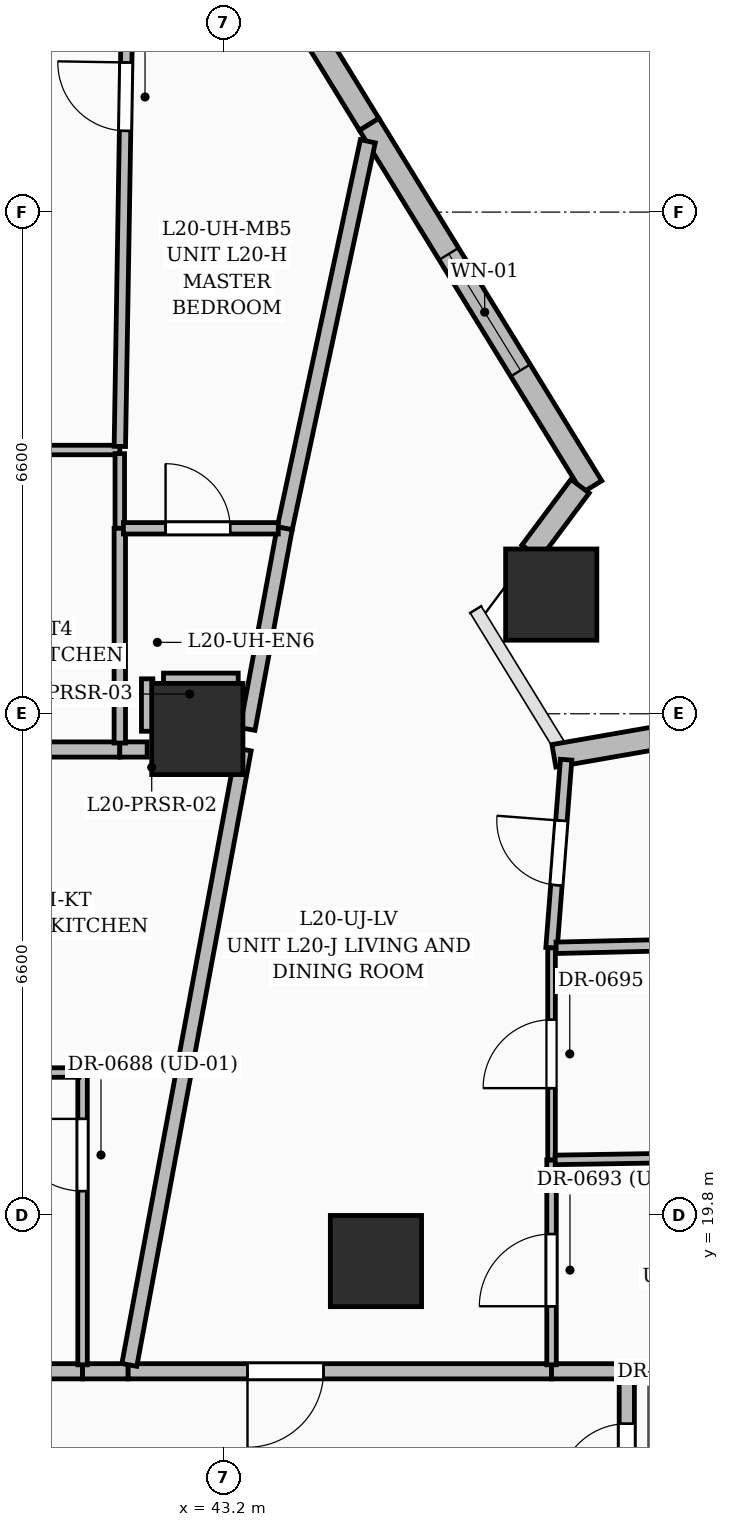
"""IFC4 building model, lengths in metres.
Left out: names, types, materials, properties, quantities, classifications, styles, units other than length and angle.
Written with IfcOpenShell. Run it as: python <this file> out.ifc"""

import sys

from ifc_helpers import new_model, si_unit, direction, frame, frame_2d, origin, origin_2d, place, context, subcontext, project, spatial, rectangle, extrude, element, fill, save


model = new_model("IFC4")
c1 = context("Model", 3, precision=1e-05, world=origin(), true_north=direction((0.0, 1.0)))
c2 = subcontext(c1, "Body", "Model", "MODEL_VIEW")
j1 = project(units=[si_unit("LENGTHUNIT", "METRE"), si_unit("PLANEANGLEUNIT", "RADIAN")], contexts=[c1])
p1 = place(None, origin())
s1 = spatial("IfcSite", under=j1, at=p1, CompositionType="ELEMENT")
p2 = place(p1, origin())
s2 = spatial("IfcBuilding", under=s1, at=p2, CompositionType="ELEMENT")
p3 = place(p2, frame((0.0, 0.0, 82.2)))
s3 = spatial("IfcBuildingStorey", under=s2, at=p3, CompositionType="ELEMENT", Elevation=82.2)
for number, where, z_axis, x_axis in (
    (1, (45.2, 19.2, 0.0), (0.0, 0.0, 1.0), (1.0, 0.0, 0.0)),
    (2, (42.85, 26.2, 0.0), (0.0, 0.0, 1.0), (1.0, 0.0, 0.0)),
    (3, (47.506, 27.968, 0.0), (0.0, 0.0, 1.0), (1.0, 0.0, 0.0)),
):
    element("IfcColumn", number, at=place(p3, frame(where, z_axis=z_axis, x_axis=x_axis)), inside=s3, PredefinedType="COLUMN", context=c2, shape_type="SweptSolid", body=[
        extrude(rectangle(XDim=1.2, YDim=1.2, at=origin_2d()), origin(), (0.0, 0.0, 1.0), 3.6),
    ])
p4 = place(p3, frame((42.153, 38.967, 0.0), z_axis=(0.0, 0.0, 1.0), x_axis=(0.523687465278, -0.851910464022, 0.0)))
e4 = element("IfcWall", 4, at=p4, inside=s3, PredefinedType="SOLIDWALL", context=c2, shape_type="SweptSolid", body=[
    extrude(rectangle(XDim=5.649, YDim=0.3, at=frame_2d((2.825, 0.0))), origin(), (0.0, 0.0, 1.0), 3.35),
])
p5 = place(p4, frame((1.778, 0.0, 0.55)))
e5 = element("IfcOpeningElement", 5, at=p5, cuts=e4, PredefinedType="OPENING", context=c2, shape_type="SweptSolid", body=[
    extrude(rectangle(XDim=2.1, YDim=2.4, at=frame_2d((1.05, 1.2))), frame((0.0, 0.16, 0.0), z_axis=(0.0, -1.0, 0.0), x_axis=(1.0, 0.0, 0.0)), (0.0, 0.0, 1.0), 0.32),
])
p6 = place(p3, frame((45.111, 34.154, 0.0), z_axis=(0.0, 0.0, 1.0), x_axis=(0.523710369238, -0.851896384047, 0.0)))
e6 = element("IfcWall", 6, at=p6, inside=s3, PredefinedType="SOLIDWALL", context=c2, shape_type="SweptSolid", body=[
    extrude(rectangle(XDim=5.596, YDim=0.3, at=frame_2d((2.798, 0.0))), origin(), (0.0, 0.0, 1.0), 3.35),
])
p7 = place(p6, frame((2.0, 0.0, 0.6)))
e7 = element("IfcOpeningElement", 7, at=p7, cuts=e6, PredefinedType="OPENING", context=c2, shape_type="SweptSolid", body=[
    extrude(rectangle(XDim=1.8, YDim=2.1, at=frame_2d((0.9, 1.05))), frame((0.0, 0.16, 0.0), z_axis=(0.0, -1.0, 0.0), x_axis=(1.0, 0.0, 0.0)), (0.0, 0.0, 1.0), 0.32),
])
p8 = place(p3, frame((47.885, 29.394, 0.0), z_axis=(0.0, 0.0, 1.0), x_axis=(-0.598186461049, -0.801356947819, 0.0)))
e8 = element("IfcWall", 8, at=p8, inside=s3, PredefinedType="SOLIDWALL", context=c2, shape_type="SweptSolid", body=[
    extrude(rectangle(XDim=1.078, YDim=0.3, at=frame_2d((0.539, 0.0))), origin(), (0.0, 0.0, 1.0), 2.375),
])
p9 = place(p3, frame((47.541, 25.847, 0.0), z_axis=(0.0, 0.0, 1.0), x_axis=(0.985095505459, 0.172008270511, 0.0)))
e9 = element("IfcWall", 9, at=p9, inside=s3, PredefinedType="SOLIDWALL", context=c2, shape_type="SweptSolid", body=[
    extrude(rectangle(XDim=2.594, YDim=0.3, at=frame_2d((1.297, 0.0))), origin(), (0.0, 0.0, 1.0), 2.375),
])
p10 = place(p3, frame((48.5, 15.47, 0.0), z_axis=(0.0, 0.0, 1.0), x_axis=(0.0, 1.0, 0.0)))
e10 = element("IfcWall", 10, at=p10, inside=s3, PredefinedType="PARTITIONING", context=c2, shape_type="SweptSolid", body=[
    extrude(rectangle(XDim=2.28, YDim=0.2, at=frame_2d((1.14, 0.0))), origin(), (0.0, 0.0, 1.0), 2.345),
])
p11 = place(p10, frame((0.69, 0.0, 0.0)))
e11 = element("IfcOpeningElement", 11, at=p11, cuts=e10, PredefinedType="OPENING", context=c2, shape_type="SweptSolid", body=[
    extrude(rectangle(XDim=0.9, YDim=2.1, at=frame_2d((0.45, 1.05))), frame((0.0, 0.11, 0.0), z_axis=(0.0, -1.0, 0.0), x_axis=(1.0, 0.0, 0.0)), (0.0, 0.0, 1.0), 0.22),
])
p12 = place(p3, frame((41.34, 17.75, 0.0), z_axis=(0.0, 0.0, 1.0), x_axis=(-1.0, 0.0, 0.0)))
e12 = element("IfcWall", 12, at=p12, inside=s3, PredefinedType="PARTITIONING", context=c2, shape_type="SweptSolid", body=[
    extrude(rectangle(XDim=6.47, YDim=0.2, at=frame_2d((3.235, 0.0))), origin(), (0.0, 0.0, 1.0), 3.35),
])
p13 = place(p12, frame((2.735, 0.0, 0.0)))
e13 = element("IfcOpeningElement", 13, at=p13, cuts=e12, PredefinedType="OPENING", context=c2, shape_type="SweptSolid", body=[
    extrude(rectangle(XDim=1.0, YDim=2.2, at=frame_2d((0.5, 1.1))), frame((0.0, 0.11, 0.0), z_axis=(0.0, -1.0, 0.0), x_axis=(1.0, 0.0, 0.0)), (0.0, 0.0, 1.0), 0.22),
])
p14 = place(p3, frame((41.94, 17.75, 0.0), z_axis=(0.0, 0.0, 1.0), x_axis=(-1.0, 0.0, 0.0)))
e14 = element("IfcWall", 14, at=p14, inside=s3, PredefinedType="PARTITIONING", context=c2, shape_type="SweptSolid", body=[
    extrude(rectangle(XDim=0.6, YDim=0.2, at=frame_2d((0.3, 0.0))), origin(), (0.0, 0.0, 1.0), 3.35),
])
p15 = place(p3, frame((47.51, 17.75, 0.0), z_axis=(0.0, 0.0, 1.0), x_axis=(-1.0, 0.0, 0.0)))
e15 = element("IfcWall", 15, at=p15, inside=s3, PredefinedType="PARTITIONING", context=c2, shape_type="SweptSolid", body=[
    extrude(rectangle(XDim=5.57, YDim=0.2, at=frame_2d((2.785, 0.0))), origin(), (0.0, 0.0, 1.0), 2.309),
])
p16 = place(p15, frame((3.0, 0.0, 0.0)))
e16 = element("IfcOpeningElement", 16, at=p16, cuts=e15, PredefinedType="OPENING", context=c2, shape_type="SweptSolid", body=[
    extrude(rectangle(XDim=1.0, YDim=2.2, at=frame_2d((0.5, 1.1))), frame((0.0, 0.11, 0.0), z_axis=(0.0, -1.0, 0.0), x_axis=(1.0, 0.0, 0.0)), (0.0, 0.0, 1.0), 0.22),
])
p17 = place(p3, frame((48.415, 17.75, 0.0), z_axis=(0.0, 0.0, 1.0), x_axis=(-1.0, 0.0, 0.0)))
e17 = element("IfcWall", 17, at=p17, inside=s3, PredefinedType="PARTITIONING", context=c2, shape_type="SweptSolid", body=[
    extrude(rectangle(XDim=0.905, YDim=0.2, at=frame_2d((0.453, 0.0))), origin(), (0.0, 0.0, 1.0), 2.709),
])
p18 = place(p3, frame((54.983, 17.844, 0.0), z_axis=(0.0, 0.0, 1.0), x_axis=(-0.999894330503, -0.014537118977, 0.0)))
e18 = element("IfcWall", 18, at=p18, inside=s3, PredefinedType="PARTITIONING", context=c2, shape_type="SweptSolid", body=[
    extrude(rectangle(XDim=6.399, YDim=0.2, at=frame_2d((3.199, 0.0))), origin(), (0.0, 0.0, 1.0), 2.345),
])
p19 = place(p3, frame((41.34, 17.835, 0.0), z_axis=(0.0, 0.0, 1.0), x_axis=(0.0, 1.0, 0.0)))
e19 = element("IfcWall", 19, at=p19, inside=s3, PredefinedType="PARTITIONING", context=c2, shape_type="SweptSolid", body=[
    extrude(rectangle(XDim=3.845, YDim=0.125, at=frame_2d((1.922, 0.0))), origin(), (0.0, 0.0, 1.0), 3.35),
])
p20 = place(p19, frame((2.285, 0.0, 0.0)))
e20 = element("IfcOpeningElement", 20, at=p20, cuts=e19, PredefinedType="OPENING", context=c2, shape_type="SweptSolid", body=[
    extrude(rectangle(XDim=0.95, YDim=2.2, at=frame_2d((0.475, 1.1))), frame((0.0, 0.072, 0.0), z_axis=(0.0, -1.0, 0.0), x_axis=(1.0, 0.0, 0.0)), (0.0, 0.0, 1.0), 0.145),
])
p21 = place(p3, frame((41.292, 21.68, 0.0), z_axis=(0.0, 0.0, 1.0), x_axis=(-1.0, 0.0, 0.0)))
e21 = element("IfcWall", 21, at=p21, inside=s3, PredefinedType="PARTITIONING", context=c2, shape_type="SweptSolid", body=[
    extrude(rectangle(XDim=2.742, YDim=0.125, at=frame_2d((1.371, 0.0))), origin(), (0.0, 0.0, 1.0), 3.35),
])
p22 = place(p3, frame((41.956, 17.833, 0.0), z_axis=(0.0, 0.0, 1.0), x_axis=(0.182682671213, 0.98317192883, 0.0)))
e22 = element("IfcWall", 22, at=p22, inside=s3, PredefinedType="PARTITIONING", context=c2, shape_type="SweptSolid", body=[
    extrude(rectangle(XDim=8.235, YDim=0.2, at=frame_2d((4.118, 0.0))), origin(), (0.0, 0.0, 1.0), 2.309),
])
p23 = place(p3, frame((41.83, 25.93, 0.0), z_axis=(0.0, 0.0, 1.0), x_axis=(-1.0, 0.0, 0.0)))
e23 = element("IfcWall", 23, at=p23, inside=s3, PredefinedType="PARTITIONING", context=c2, shape_type="SweptSolid", body=[
    extrude(rectangle(XDim=3.233, YDim=0.2, at=frame_2d((1.616, 0.0))), origin(), (0.0, 0.0, 1.0), 2.37),
])
p24 = place(p3, frame((42.19, 25.93, 0.0), z_axis=(0.0, 0.0, 1.0), x_axis=(-1.0, 0.0, 0.0)))
e24 = element("IfcWall", 24, at=p24, inside=s3, PredefinedType="PARTITIONING", context=c2, shape_type="SweptSolid", body=[
    extrude(rectangle(XDim=0.36, YDim=0.2, at=frame_2d((0.18, 0.0))), origin(), (0.0, 0.0, 1.0), 2.37),
])
p25 = place(p3, frame((47.51, 23.32, 0.0), z_axis=(0.0, 0.0, 1.0), x_axis=(0.077275386284, 0.997009786649, 0.0)))
e25 = element("IfcWall", 25, at=p25, inside=s3, PredefinedType="PARTITIONING", context=c2, shape_type="SweptSolid", body=[
    extrude(rectangle(XDim=2.483, YDim=0.15, at=frame_2d((1.242, 0.0))), origin(), (0.0, 0.0, 1.0), 3.35),
])
p26 = place(p25, frame((0.828, 0.0, 0.0)))
e26 = element("IfcOpeningElement", 26, at=p26, cuts=e25, PredefinedType="OPENING", context=c2, shape_type="SweptSolid", body=[
    extrude(rectangle(XDim=0.85, YDim=2.1, at=frame_2d((0.425, 1.05))), frame((0.0, 0.085, 0.0), z_axis=(0.0, -1.0, 0.0), x_axis=(1.0, 0.0, 0.0)), (0.0, 0.0, 1.0), 0.17),
])
p27 = place(p3, frame((47.51, 17.835, 0.0), z_axis=(0.0, 0.0, 1.0), x_axis=(0.0, 1.0, 0.0)))
e27 = element("IfcWall", 27, at=p27, inside=s3, PredefinedType="PARTITIONING", context=c2, shape_type="SweptSolid", body=[
    extrude(rectangle(XDim=2.695, YDim=0.125, at=frame_2d((1.348, 0.0))), origin(), (0.0, 0.0, 1.0), 2.709),
])
p28 = place(p27, frame((0.771, 0.0, 0.0)))
e28 = element("IfcOpeningElement", 28, at=p28, cuts=e27, PredefinedType="OPENING", context=c2, shape_type="SweptSolid", body=[
    extrude(rectangle(XDim=0.95, YDim=2.2, at=frame_2d((0.475, 1.1))), frame((0.0, 0.072, 0.0), z_axis=(0.0, -1.0, 0.0), x_axis=(1.0, 0.0, 0.0)), (0.0, 0.0, 1.0), 0.145),
])
p29 = place(p3, frame((47.51, 20.53, 0.0), z_axis=(0.0, 0.0, 1.0), x_axis=(0.0, 1.0, 0.0)))
e29 = element("IfcWall", 29, at=p29, inside=s3, PredefinedType="PARTITIONING", context=c2, shape_type="SweptSolid", body=[
    extrude(rectangle(XDim=2.79, YDim=0.1, at=frame_2d((1.395, 0.0))), origin(), (0.0, 0.0, 1.0), 2.709),
])
p30 = place(p29, frame((0.945, 0.0, 0.0)))
e30 = element("IfcOpeningElement", 30, at=p30, cuts=e29, PredefinedType="OPENING", context=c2, shape_type="SweptSolid", body=[
    extrude(rectangle(XDim=0.9, YDim=2.15, at=frame_2d((0.45, 1.075))), frame((0.0, 0.06, 0.0), z_axis=(0.0, -1.0, 0.0), x_axis=(1.0, 0.0, 0.0)), (0.0, 0.0, 1.0), 0.12),
])
p31 = place(p3, frame((45.093, 33.932, 0.0), z_axis=(0.0, 0.0, 1.0), x_axis=(-0.209881245986, -0.977726885476, 0.0)))
e31 = element("IfcWall", 31, at=p31, inside=s3, PredefinedType="PARTITIONING", context=c2, shape_type="SweptSolid", body=[
    extrude(rectangle(XDim=5.208, YDim=0.2, at=frame_2d((2.604, 0.0))), origin(), (0.0, 0.0, 1.0), 2.37),
])
p32 = place(p3, frame((44.0, 28.84, 0.0), z_axis=(0.0, 0.0, 1.0), x_axis=(-0.18247668152, -0.983210181345, 0.0)))
e32 = element("IfcWall", 32, at=p32, inside=s3, PredefinedType="PARTITIONING", context=c2, shape_type="SweptSolid", body=[
    extrude(rectangle(XDim=2.685, YDim=0.2, at=frame_2d((1.343, 0.0))), origin(), (0.0, 0.0, 1.0), 2.709),
])
p33 = place(p3, frame((47.57, 23.321, 0.0), z_axis=(0.0, 0.0, 1.0), x_axis=(0.999720663017, 0.023634634246, 0.0)))
e33 = element("IfcWall", 33, at=p33, inside=s3, PredefinedType="PARTITIONING", context=c2, shape_type="SweptSolid", body=[
    extrude(rectangle(XDim=4.008, YDim=0.15, at=frame_2d((2.004, 0.0))), origin(), (0.0, 0.0, 1.0), 2.37),
])
p34 = place(p3, frame((53.298, 20.625, 0.0), z_axis=(0.0, 0.0, 1.0), x_axis=(-0.9998645785, -0.016456751239, 0.0)))
e34 = element("IfcWall", 34, at=p34, inside=s3, PredefinedType="PARTITIONING", context=c2, shape_type="SweptSolid", body=[
    extrude(rectangle(XDim=5.741, YDim=0.125, at=frame_2d((2.871, 0.0))), origin(), (0.0, 0.0, 1.0), 2.709),
])
p35 = place(p3, frame((37.655, 29.87, 0.0), z_axis=(0.0, 0.0, 1.0), x_axis=(1.0, 0.0, 0.0)))
e35 = element("IfcWall", 35, at=p35, inside=s3, PredefinedType="PARTITIONING", context=c2, shape_type="SweptSolid", body=[
    extrude(rectangle(XDim=4.175, YDim=0.125, at=frame_2d((2.087, 0.0))), origin(), (0.0, 0.0, 1.0), 3.35),
])
p36 = place(p35, frame((1.57, 0.0, 0.0)))
e36 = element("IfcOpeningElement", 36, at=p36, cuts=e35, PredefinedType="OPENING", context=c2, shape_type="SweptSolid", body=[
    extrude(rectangle(XDim=0.95, YDim=2.2, at=frame_2d((0.475, 1.1))), frame((0.0, 0.072, 0.0), z_axis=(0.0, -1.0, 0.0), x_axis=(1.0, 0.0, 0.0)), (0.0, 0.0, 1.0), 0.145),
])
p37 = place(p3, frame((41.831, 29.917, 0.0), z_axis=(0.0, 0.0, 1.0), x_axis=(0.016599696118, 0.999862215552, 0.0)))
e37 = element("IfcWall", 37, at=p37, inside=s3, PredefinedType="PARTITIONING", context=c2, shape_type="SweptSolid", body=[
    extrude(rectangle(XDim=9.06, YDim=0.15, at=frame_2d((4.53, 0.0))), origin(), (0.0, 0.0, 1.0), 2.345),
])
p38 = place(p37, frame((4.152, 0.0, 0.0)))
e38 = element("IfcOpeningElement", 38, at=p38, cuts=e37, PredefinedType="OPENING", context=c2, shape_type="SweptSolid", body=[
    extrude(rectangle(XDim=0.9, YDim=2.15, at=frame_2d((0.45, 1.075))), frame((0.0, 0.085, 0.0), z_axis=(0.0, -1.0, 0.0), x_axis=(1.0, 0.0, 0.0)), (0.0, 0.0, 1.0), 0.17),
])
p39 = place(p3, frame((41.83, 28.84, 0.0), z_axis=(0.0, 0.0, 1.0), x_axis=(0.0, 1.0, 0.0)))
e39 = element("IfcWall", 39, at=p39, inside=s3, PredefinedType="PARTITIONING", context=c2, shape_type="SweptSolid", body=[
    extrude(rectangle(XDim=0.982, YDim=0.125, at=frame_2d((0.491, 0.0))), origin(), (0.0, 0.0, 1.0), 2.709),
])
p40 = place(p3, frame((41.83, 26.015, 0.0), z_axis=(0.0, 0.0, 1.0), x_axis=(0.0, 1.0, 0.0)))
e40 = element("IfcWall", 40, at=p40, inside=s3, PredefinedType="PARTITIONING", context=c2, shape_type="SweptSolid", body=[
    extrude(rectangle(XDim=2.825, YDim=0.15, at=frame_2d((1.413, 0.0))), origin(), (0.0, 0.0, 1.0), 2.37),
])
p41 = place(p3, frame((41.877, 28.84, 0.0), z_axis=(0.0, 0.0, 1.0), x_axis=(1.0, 0.0, 0.0)))
e41 = element("IfcWall", 41, at=p41, inside=s3, PredefinedType="PARTITIONING", context=c2, shape_type="SweptSolid", body=[
    extrude(rectangle(XDim=2.038, YDim=0.15, at=frame_2d((1.019, 0.0))), origin(), (0.0, 0.0, 1.0), 2.345),
])
p42 = place(p41, frame((0.555, 0.0, 0.0)))
e42 = element("IfcOpeningElement", 42, at=p42, cuts=e41, PredefinedType="OPENING", context=c2, shape_type="SweptSolid", body=[
    extrude(rectangle(XDim=0.85, YDim=2.1, at=frame_2d((0.425, 1.05))), frame((0.0, 0.085, 0.0), z_axis=(0.0, -1.0, 0.0), x_axis=(1.0, 0.0, 0.0)), (0.0, 0.0, 1.0), 0.17),
])
p43 = place(p3, frame((42.19, 26.17, 0.0), z_axis=(0.0, 0.0, 1.0), x_axis=(0.0, 1.0, 0.0)))
e43 = element("IfcWall", 43, at=p43, inside=s3, PredefinedType="PARTITIONING", context=c2, shape_type="SweptSolid", body=[
    extrude(rectangle(XDim=0.69, YDim=0.15, at=frame_2d((0.345, 0.0))), origin(), (0.0, 0.0, 1.0), 2.37),
])
p44 = place(p3, frame((42.405, 26.86, 0.0), z_axis=(0.0, 0.0, 1.0), x_axis=(1.0, 0.0, 0.0)))
e44 = element("IfcWall", 44, at=p44, inside=s3, PredefinedType="PARTITIONING", context=c2, shape_type="SweptSolid", body=[
    extrude(rectangle(XDim=0.983, YDim=0.15, at=frame_2d((0.491, 0.0))), origin(), (0.0, 0.0, 1.0), 2.345),
])
p45 = place(p7, origin())
e45 = element("IfcWindow", 45, at=p45, inside=s3, PartitioningType="SINGLE_PANEL", PredefinedType="WINDOW", context=c2, shape_type="SweptSolid", body=[
    extrude(rectangle(XDim=1.8, YDim=2.1, at=frame_2d((0.9, 1.05))), frame((0.0, 0.03, 0.0), z_axis=(0.0, -1.0, 0.0), x_axis=(1.0, 0.0, 0.0)), (0.0, 0.0, 1.0), 0.06),
])
fill(e7, e45)
p46 = place(p11, origin())
e46 = element("IfcDoor", 46, at=p46, inside=s3, OperationType="SINGLE_SWING_LEFT", PredefinedType="DOOR", context=c2, shape_type="SweptSolid", body=[
    extrude(rectangle(XDim=0.9, YDim=2.1, at=frame_2d((0.45, 1.05))), frame((0.0, 0.025, 0.0), z_axis=(0.0, -1.0, 0.0), x_axis=(1.0, 0.0, 0.0)), (0.0, 0.0, 1.0), 0.05),
])
fill(e11, e46)
p47 = place(p20, origin())
e47 = element("IfcDoor", 47, at=p47, inside=s3, OperationType="SINGLE_SWING_RIGHT", PredefinedType="DOOR", context=c2, shape_type="SweptSolid", body=[
    extrude(rectangle(XDim=0.95, YDim=2.2, at=frame_2d((0.475, 1.1))), frame((0.0, 0.025, 0.0), z_axis=(0.0, -1.0, 0.0), x_axis=(1.0, 0.0, 0.0)), (0.0, 0.0, 1.0), 0.05),
])
fill(e20, e47)
p48 = place(p16, origin())
e48 = element("IfcDoor", 48, at=p48, inside=s3, OperationType="SINGLE_SWING_RIGHT", PredefinedType="DOOR", context=c2, shape_type="SweptSolid", body=[
    extrude(rectangle(XDim=1.0, YDim=2.2, at=frame_2d((0.5, 1.1))), frame((0.0, 0.025, 0.0), z_axis=(0.0, -1.0, 0.0), x_axis=(1.0, 0.0, 0.0)), (0.0, 0.0, 1.0), 0.05),
])
fill(e16, e48)
p49 = place(p28, origin())
e49 = element("IfcDoor", 49, at=p49, inside=s3, OperationType="SINGLE_SWING_LEFT", PredefinedType="DOOR", context=c2, shape_type="SweptSolid", body=[
    extrude(rectangle(XDim=0.95, YDim=2.2, at=frame_2d((0.475, 1.1))), frame((0.0, 0.025, 0.0), z_axis=(0.0, -1.0, 0.0), x_axis=(1.0, 0.0, 0.0)), (0.0, 0.0, 1.0), 0.05),
])
fill(e28, e49)
p50 = place(p26, origin())
e50 = element("IfcDoor", 50, at=p50, inside=s3, OperationType="SINGLE_SWING_RIGHT", PredefinedType="DOOR", context=c2, shape_type="SweptSolid", body=[
    extrude(rectangle(XDim=0.85, YDim=2.1, at=frame_2d((0.425, 1.05))), frame((0.0, 0.025, 0.0), z_axis=(0.0, -1.0, 0.0), x_axis=(1.0, 0.0, 0.0)), (0.0, 0.0, 1.0), 0.05),
])
fill(e26, e50)
p51 = place(p30, origin())
e51 = element("IfcDoor", 51, at=p51, inside=s3, OperationType="SINGLE_SWING_LEFT", PredefinedType="DOOR", context=c2, shape_type="SweptSolid", body=[
    extrude(rectangle(XDim=0.9, YDim=2.15, at=frame_2d((0.45, 1.075))), frame((0.0, 0.025, 0.0), z_axis=(0.0, -1.0, 0.0), x_axis=(1.0, 0.0, 0.0)), (0.0, 0.0, 1.0), 0.05),
])
fill(e30, e51)
p52 = place(p38, origin())
e52 = element("IfcDoor", 52, at=p52, inside=s3, OperationType="SINGLE_SWING_RIGHT", PredefinedType="DOOR", context=c2, shape_type="SweptSolid", body=[
    extrude(rectangle(XDim=0.9, YDim=2.15, at=frame_2d((0.45, 1.075))), frame((0.0, 0.025, 0.0), z_axis=(0.0, -1.0, 0.0), x_axis=(1.0, 0.0, 0.0)), (0.0, 0.0, 1.0), 0.05),
])
fill(e38, e52)
p53 = place(p42, origin())
e53 = element("IfcDoor", 53, at=p53, inside=s3, OperationType="SINGLE_SWING_LEFT", PredefinedType="DOOR", context=c2, shape_type="SweptSolid", body=[
    extrude(rectangle(XDim=0.85, YDim=2.1, at=frame_2d((0.425, 1.05))), frame((0.0, 0.025, 0.0), z_axis=(0.0, -1.0, 0.0), x_axis=(1.0, 0.0, 0.0)), (0.0, 0.0, 1.0), 0.05),
])
fill(e42, e53)
save(model, sys.argv[1])
